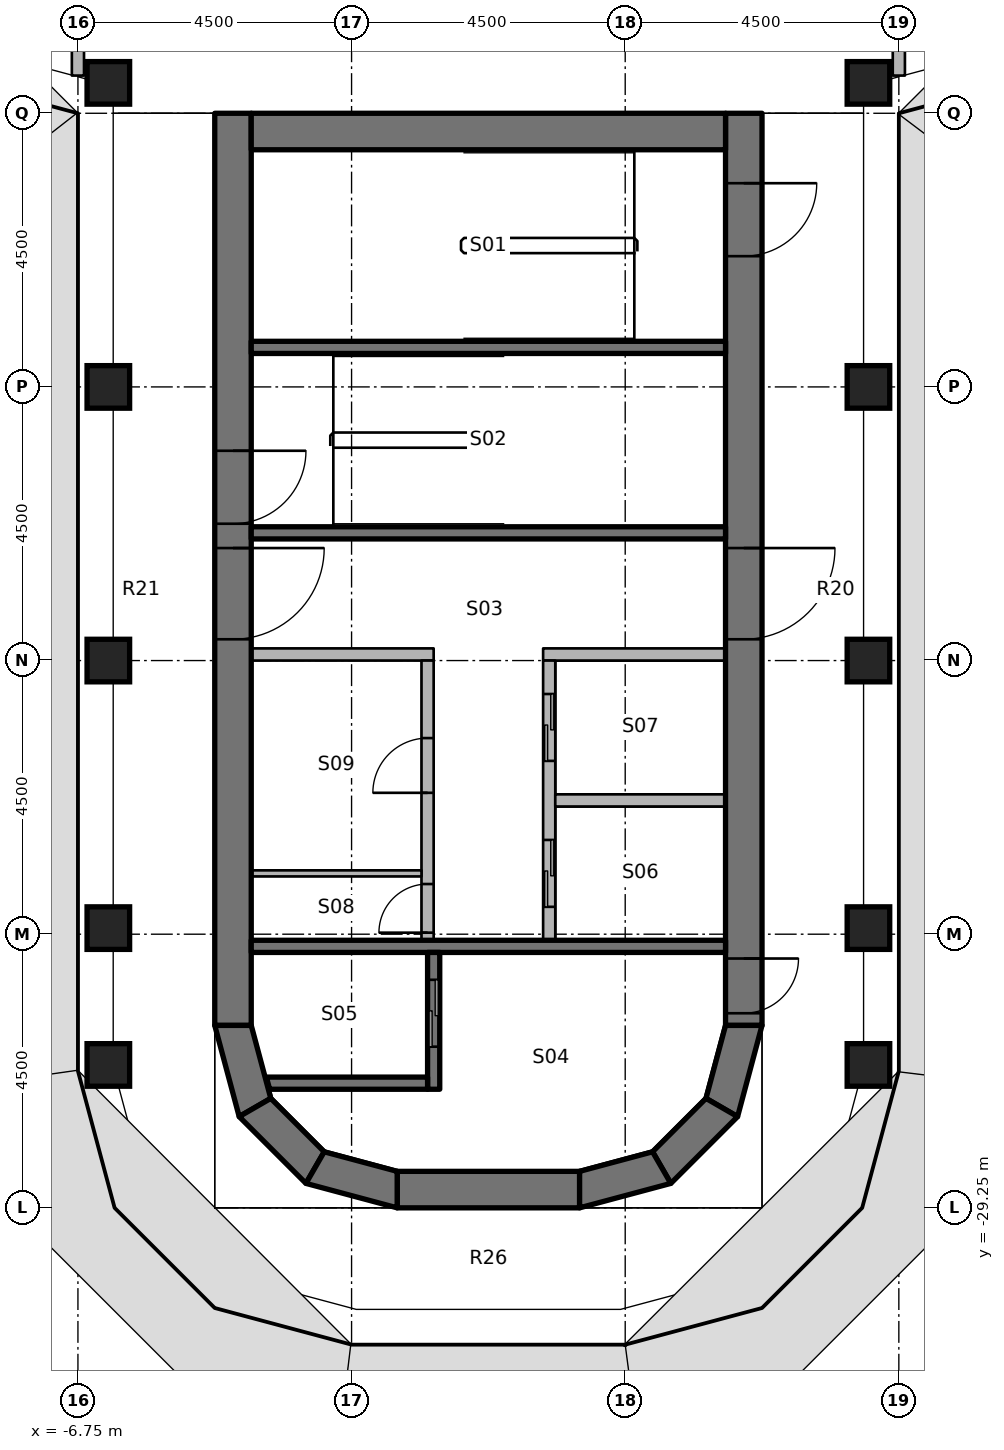
"""IFC4 building model, lengths in metres.
Left out: names, types, materials, properties, quantities, classifications, styles, units other than length and angle.
Written with IfcOpenShell. Run it as: python <this file> out.ifc"""

import sys

from ifc_helpers import new_model, si_unit, direction, frame, frame_2d, origin, origin_2d, place, context, subcontext, project, spatial, polyline, rectangle, outline, extrude, element, fill, save


model = new_model("IFC4")
c1 = context("Model", 3, precision=1e-05, world=origin(), true_north=direction((0.0, 1.0)))
c2 = subcontext(c1, "Body", "Model", "MODEL_VIEW")
j1 = project(units=[si_unit("LENGTHUNIT", "METRE"), si_unit("PLANEANGLEUNIT", "RADIAN")], contexts=[c1])
p1 = place(None, origin())
s1 = spatial("IfcSite", under=j1, at=p1, CompositionType="ELEMENT")
p2 = place(p1, origin())
s2 = spatial("IfcBuilding", under=s1, at=p2, CompositionType="ELEMENT")
p3 = place(p2, frame((0.0, 0.0, 206.8)))
s3 = spatial("IfcBuildingStorey", under=s2, at=p3, CompositionType="ELEMENT", Elevation=206.8)
for number, where, z_axis, x_axis in (
    (1, (-6.25, -26.9, 0.0), (0.0, 0.0, 1.0), (1.0, 0.0, 0.0)),
    (2, (-6.25, -24.65, 0.0), (0.0, 0.0, 1.0), (1.0, 0.0, 0.0)),
    (3, (-6.25, -20.25, 0.0), (0.0, 0.0, 1.0), (1.0, 0.0, 0.0)),
    (4, (-6.25, -15.75, 0.0), (0.0, 0.0, 1.0), (1.0, 0.0, 0.0)),
    (5, (-6.25, -10.75, 0.0), (0.0, 0.0, 1.0), (1.0, 0.0, 0.0)),
    (6, (6.25, -26.9, 0.0), (0.0, 0.0, 1.0), (1.0, 0.0, 0.0)),
    (7, (6.25, -24.65, 0.0), (0.0, 0.0, 1.0), (1.0, 0.0, 0.0)),
    (8, (6.25, -20.25, 0.0), (0.0, 0.0, 1.0), (1.0, 0.0, 0.0)),
    (9, (6.25, -15.75, 0.0), (0.0, 0.0, 1.0), (1.0, 0.0, 0.0)),
    (10, (6.25, -10.75, 0.0), (0.0, 0.0, 1.0), (1.0, 0.0, 0.0)),
):
    element("IfcColumn", number, at=place(p3, frame(where, z_axis=z_axis, x_axis=x_axis)), inside=s3, PredefinedType="COLUMN", context=c2, shape_type="SweptSolid", body=[
        extrude(rectangle(XDim=0.7, YDim=0.7, at=origin_2d()), origin(), (0.0, 0.0, 1.0), 3.65),
    ])
p4 = place(p3, frame((-4.2, -11.25, 0.0), z_axis=(0.0, 0.0, 1.0), x_axis=(0.0, -1.0, 0.0)))
e11 = element("IfcWall", 11, at=p4, inside=s3, PredefinedType="SHEAR", context=c2, shape_type="SweptSolid", body=[
    extrude(rectangle(XDim=15.0, YDim=0.6, at=frame_2d((7.5, 0.0))), origin(), (0.0, 0.0, 1.0), 3.8),
])
p5 = place(p4, frame((7.15, 0.0, 0.0)))
e12 = element("IfcOpeningElement", 12, at=p5, cuts=e11, PredefinedType="OPENING", context=c2, shape_type="SweptSolid", body=[
    extrude(rectangle(XDim=1.5, YDim=2.3, at=frame_2d((0.75, 1.15))), frame((0.0, 0.31, 0.0), z_axis=(0.0, -1.0, 0.0), x_axis=(1.0, 0.0, 0.0)), (0.0, 0.0, 1.0), 0.62),
])
p6 = place(p4, frame((5.55, 0.0, 0.0)))
e13 = element("IfcOpeningElement", 13, at=p6, cuts=e11, PredefinedType="OPENING", context=c2, shape_type="SweptSolid", body=[
    extrude(rectangle(XDim=1.2, YDim=2.1, at=frame_2d((0.6, 1.05))), frame((0.0, 0.31, 0.0), z_axis=(0.0, -1.0, 0.0), x_axis=(1.0, 0.0, 0.0)), (0.0, 0.0, 1.0), 0.62),
])
p7 = place(p3, frame((4.2, -11.25, 0.0), z_axis=(0.0, 0.0, 1.0), x_axis=(0.0, -1.0, 0.0)))
e14 = element("IfcWall", 14, at=p7, inside=s3, PredefinedType="SHEAR", context=c2, shape_type="SweptSolid", body=[
    extrude(rectangle(XDim=15.0, YDim=0.6, at=frame_2d((7.5, 0.0))), origin(), (0.0, 0.0, 1.0), 3.8),
])
p8 = place(p7, frame((7.15, 0.0, 0.0)))
e15 = element("IfcOpeningElement", 15, at=p8, cuts=e14, PredefinedType="OPENING", context=c2, shape_type="SweptSolid", body=[
    extrude(rectangle(XDim=1.5, YDim=2.3, at=frame_2d((0.75, 1.15))), frame((0.0, 0.31, 0.0), z_axis=(0.0, -1.0, 0.0), x_axis=(1.0, 0.0, 0.0)), (0.0, 0.0, 1.0), 0.62),
])
p9 = place(p7, frame((13.9, 0.0, 0.0)))
e16 = element("IfcOpeningElement", 16, at=p9, cuts=e14, PredefinedType="OPENING", context=c2, shape_type="SweptSolid", body=[
    extrude(rectangle(XDim=0.9, YDim=2.1, at=frame_2d((0.45, 1.05))), frame((0.0, 0.31, 0.0), z_axis=(0.0, -1.0, 0.0), x_axis=(1.0, 0.0, 0.0)), (0.0, 0.0, 1.0), 0.62),
])
p10 = place(p7, frame((1.15, 0.0, 0.0)))
e17 = element("IfcOpeningElement", 17, at=p10, cuts=e14, PredefinedType="OPENING", context=c2, shape_type="SweptSolid", body=[
    extrude(rectangle(XDim=1.2, YDim=2.1, at=frame_2d((0.6, 1.05))), frame((0.0, 0.31, 0.0), z_axis=(0.0, -1.0, 0.0), x_axis=(1.0, 0.0, 0.0)), (0.0, 0.0, 1.0), 0.62),
])
p11 = place(p3, frame((-3.9, -11.55, 0.0), z_axis=(0.0, 0.0, 1.0), x_axis=(1.0, 0.0, 0.0)))
e18 = element("IfcWall", 18, at=p11, inside=s3, PredefinedType="SHEAR", context=c2, shape_type="SweptSolid", body=[
    extrude(rectangle(XDim=7.8, YDim=0.6, at=frame_2d((3.9, 0.0))), origin(), (0.0, 0.0, 1.0), 3.8),
])
p12 = place(p3, frame((-1.5, -28.95, 0.0), z_axis=(0.0, 0.0, 1.0), x_axis=(1.0, 0.0, 0.0)))
e19 = element("IfcWall", 19, at=p12, inside=s3, PredefinedType="SHEAR", context=c2, shape_type="SweptSolid", body=[
    extrude(rectangle(XDim=3.0, YDim=0.6, at=frame_2d((1.5, 0.0))), origin(), (0.0, 0.0, 1.0), 3.8),
])
p13 = place(p3, origin())
e20 = element("IfcWall", 20, at=p13, inside=s3, PredefinedType="SHEAR", context=c2, shape_type="SweptSolid", body=[
    extrude(outline(polyline([(-4.5, -26.25), (-4.098, -27.75), (-3.579, -27.45), (-3.9, -26.25), (-4.5, -26.25)])), origin(), (0.0, 0.0, 1.0), 3.8),
])
p14 = place(p3, origin())
e21 = element("IfcWall", 21, at=p14, inside=s3, PredefinedType="SHEAR", context=c2, shape_type="SweptSolid", body=[
    extrude(outline(polyline([(-4.098, -27.75), (-3.0, -28.848), (-2.7, -28.329), (-3.579, -27.45), (-4.098, -27.75)])), origin(), (0.0, 0.0, 1.0), 3.8),
])
p15 = place(p3, origin())
e22 = element("IfcWall", 22, at=p15, inside=s3, PredefinedType="SHEAR", context=c2, shape_type="SweptSolid", body=[
    extrude(outline(polyline([(-3.0, -28.848), (-1.5, -29.25), (-1.5, -28.65), (-2.7, -28.329), (-3.0, -28.848)])), origin(), (0.0, 0.0, 1.0), 3.8),
])
p16 = place(p3, origin())
e23 = element("IfcWall", 23, at=p16, inside=s3, PredefinedType="SHEAR", context=c2, shape_type="SweptSolid", body=[
    extrude(outline(polyline([(4.5, -26.25), (4.098, -27.75), (3.579, -27.45), (3.9, -26.25), (4.5, -26.25)])), origin(), (0.0, 0.0, 1.0), 3.8),
])
p17 = place(p3, origin())
e24 = element("IfcWall", 24, at=p17, inside=s3, PredefinedType="SHEAR", context=c2, shape_type="SweptSolid", body=[
    extrude(outline(polyline([(4.098, -27.75), (3.0, -28.848), (2.7, -28.329), (3.579, -27.45), (4.098, -27.75)])), origin(), (0.0, 0.0, 1.0), 3.8),
])
p18 = place(p3, origin())
e25 = element("IfcWall", 25, at=p18, inside=s3, PredefinedType="SHEAR", context=c2, shape_type="SweptSolid", body=[
    extrude(outline(polyline([(3.0, -28.848), (1.5, -29.25), (1.5, -28.65), (2.7, -28.329), (3.0, -28.848)])), origin(), (0.0, 0.0, 1.0), 3.8),
])
p19 = place(p3, frame((3.9, -24.95, 0.0), z_axis=(0.0, 0.0, 1.0), x_axis=(-1.0, 0.0, 0.0)))
e26 = element("IfcWall", 26, at=p19, inside=s3, PredefinedType="SHEAR", context=c2, shape_type="SweptSolid", body=[
    extrude(rectangle(XDim=7.8, YDim=0.2, at=frame_2d((3.9, 0.0))), origin(), (0.0, 0.0, 1.0), 3.65),
])
p20 = place(p3, frame((-0.9, -27.3, 0.0), z_axis=(0.0, 0.0, 1.0), x_axis=(0.0, 1.0, 0.0)))
e27 = element("IfcWall", 27, at=p20, inside=s3, PredefinedType="SHEAR", context=c2, shape_type="SweptSolid", body=[
    extrude(rectangle(XDim=2.25, YDim=0.2, at=frame_2d((1.125, 0.0))), origin(), (0.0, 0.0, 1.0), 3.65),
])
p21 = place(p20, frame((0.7, 0.0, 0.0)))
e28 = element("IfcOpeningElement", 28, at=p21, cuts=e27, PredefinedType="OPENING", context=c2, shape_type="SweptSolid", body=[
    extrude(rectangle(XDim=1.1, YDim=2.3, at=frame_2d((0.55, 1.15))), frame((0.0, 0.11, 0.0), z_axis=(0.0, -1.0, 0.0), x_axis=(1.0, 0.0, 0.0)), (0.0, 0.0, 1.0), 0.22),
])
p22 = place(p3, origin())
e29 = element("IfcWall", 29, at=p22, inside=s3, PredefinedType="SHEAR", context=c2, shape_type="SweptSolid", body=[
    extrude(outline(polyline([(-1.0, -27.1), (-3.651, -27.1), (-3.597, -27.3), (-1.0, -27.3), (-1.0, -27.1)])), origin(), (0.0, 0.0, 1.0), 3.65),
])
for number, where, z_axis, x_axis in (
    (30, (3.9, -18.15, 0.0), (0.0, 0.0, 1.0), (-1.0, 0.0, 0.0)),
    (31, (3.9, -15.1, 0.0), (0.0, 0.0, 1.0), (-1.0, 0.0, 0.0)),
):
    element("IfcWall", number, at=place(p3, frame(where, z_axis=z_axis, x_axis=x_axis)), inside=s3, PredefinedType="SHEAR", context=c2, shape_type="SweptSolid", body=[
        extrude(rectangle(XDim=7.8, YDim=0.2, at=frame_2d((3.9, 0.0))), origin(), (0.0, 0.0, 1.0), 3.65),
    ])
p23 = place(p3, frame((3.9, -20.15, 0.0), z_axis=(0.0, 0.0, 1.0), x_axis=(-1.0, 0.0, 0.0)))
e32 = element("IfcWall", 32, at=p23, inside=s3, PredefinedType="PARTITIONING", context=c2, shape_type="SweptSolid", body=[
    extrude(rectangle(XDim=3.0, YDim=0.2, at=frame_2d((1.5, 0.0))), origin(), (0.0, 0.0, 1.0), 3.65),
])
p24 = place(p3, frame((1.0, -24.85, 0.0), z_axis=(0.0, 0.0, 1.0), x_axis=(0.0, 1.0, 0.0)))
e33 = element("IfcWall", 33, at=p24, inside=s3, PredefinedType="PARTITIONING", context=c2, shape_type="SweptSolid", body=[
    extrude(rectangle(XDim=4.6, YDim=0.2, at=frame_2d((2.3, 0.0))), origin(), (0.0, 0.0, 1.0), 3.65),
])
p25 = place(p24, frame((0.55, 0.0, 0.0)))
e34 = element("IfcOpeningElement", 34, at=p25, cuts=e33, PredefinedType="OPENING", context=c2, shape_type="SweptSolid", body=[
    extrude(rectangle(XDim=1.1, YDim=2.3, at=frame_2d((0.55, 1.15))), frame((0.0, 0.11, 0.0), z_axis=(0.0, -1.0, 0.0), x_axis=(1.0, 0.0, 0.0)), (0.0, 0.0, 1.0), 0.22),
])
p26 = place(p24, frame((2.95, 0.0, 0.0)))
e35 = element("IfcOpeningElement", 35, at=p26, cuts=e33, PredefinedType="OPENING", context=c2, shape_type="SweptSolid", body=[
    extrude(rectangle(XDim=1.1, YDim=2.3, at=frame_2d((0.55, 1.15))), frame((0.0, 0.11, 0.0), z_axis=(0.0, -1.0, 0.0), x_axis=(1.0, 0.0, 0.0)), (0.0, 0.0, 1.0), 0.22),
])
p27 = place(p3, frame((-0.9, -20.15, 0.0), z_axis=(0.0, 0.0, 1.0), x_axis=(-1.0, 0.0, 0.0)))
e36 = element("IfcWall", 36, at=p27, inside=s3, PredefinedType="PARTITIONING", context=c2, shape_type="SweptSolid", body=[
    extrude(rectangle(XDim=3.0, YDim=0.2, at=frame_2d((1.5, 0.0))), origin(), (0.0, 0.0, 1.0), 3.65),
])
p28 = place(p3, frame((-1.0, -24.85, 0.0), z_axis=(0.0, 0.0, 1.0), x_axis=(0.0, 1.0, 0.0)))
e37 = element("IfcWall", 37, at=p28, inside=s3, PredefinedType="PARTITIONING", context=c2, shape_type="SweptSolid", body=[
    extrude(rectangle(XDim=4.6, YDim=0.2, at=frame_2d((2.3, 0.0))), origin(), (0.0, 0.0, 1.0), 3.65),
])
p29 = place(p28, frame((0.125, 0.0, 0.0)))
e38 = element("IfcOpeningElement", 38, at=p29, cuts=e37, PredefinedType="OPENING", context=c2, shape_type="SweptSolid", body=[
    extrude(rectangle(XDim=0.8, YDim=2.1, at=frame_2d((0.4, 1.05))), frame((0.0, 0.11, 0.0), z_axis=(0.0, -1.0, 0.0), x_axis=(1.0, 0.0, 0.0)), (0.0, 0.0, 1.0), 0.22),
])
p30 = place(p28, frame((2.425, 0.0, 0.0)))
e39 = element("IfcOpeningElement", 39, at=p30, cuts=e37, PredefinedType="OPENING", context=c2, shape_type="SweptSolid", body=[
    extrude(rectangle(XDim=0.9, YDim=2.1, at=frame_2d((0.45, 1.05))), frame((0.0, 0.11, 0.0), z_axis=(0.0, -1.0, 0.0), x_axis=(1.0, 0.0, 0.0)), (0.0, 0.0, 1.0), 0.22),
])
p31 = place(p3, frame((3.9, -22.55, 0.0), z_axis=(0.0, 0.0, 1.0), x_axis=(-1.0, 0.0, 0.0)))
e40 = element("IfcWall", 40, at=p31, inside=s3, PredefinedType="PARTITIONING", context=c2, shape_type="SweptSolid", body=[
    extrude(rectangle(XDim=2.8, YDim=0.2, at=frame_2d((1.4, 0.0))), origin(), (0.0, 0.0, 1.0), 3.65),
])
p32 = place(p3, frame((-1.1, -23.75, 0.0), z_axis=(0.0, 0.0, 1.0), x_axis=(-1.0, 0.0, 0.0)))
e41 = element("IfcWall", 41, at=p32, inside=s3, PredefinedType="PARTITIONING", context=c2, shape_type="SweptSolid", body=[
    extrude(rectangle(XDim=2.8, YDim=0.1, at=frame_2d((1.4, 0.0))), origin(), (0.0, 0.0, 1.0), 3.65),
])
for number, where, z_axis, x_axis in (
    (42, (6.75, -10.63, 0.0), (0.0, 0.0, 1.0), (0.0, 1.0, 0.0)),
    (43, (-6.75, -10.63, 0.0), (0.0, 0.0, 1.0), (0.0, 1.0, 0.0)),
):
    element("IfcWall", number, at=place(p3, frame(where, z_axis=z_axis, x_axis=x_axis)), inside=s3, PredefinedType="PARTITIONING", context=c2, shape_type="SweptSolid", body=[
        extrude(rectangle(XDim=3.78, YDim=0.2, at=frame_2d((1.89, 0.0))), origin(), (0.0, 0.0, 1.0), 2.75),
    ])
p33 = place(p8, origin())
e44 = element("IfcDoor", 44, at=p33, inside=s3, OperationType="DOUBLE_DOOR_SINGLE_SWING", PredefinedType="DOOR", context=c2, shape_type="SweptSolid", body=[
    extrude(rectangle(XDim=1.5, YDim=2.3, at=frame_2d((0.75, 1.15))), frame((0.0, 0.025, 0.0), z_axis=(0.0, -1.0, 0.0), x_axis=(1.0, 0.0, 0.0)), (0.0, 0.0, 1.0), 0.05),
])
fill(e15, e44)
p34 = place(p5, origin())
e45 = element("IfcDoor", 45, at=p34, inside=s3, OperationType="DOUBLE_DOOR_SINGLE_SWING", PredefinedType="DOOR", context=c2, shape_type="SweptSolid", body=[
    extrude(rectangle(XDim=1.5, YDim=2.3, at=frame_2d((0.75, 1.15))), frame((0.0, 0.025, 0.0), z_axis=(0.0, -1.0, 0.0), x_axis=(1.0, 0.0, 0.0)), (0.0, 0.0, 1.0), 0.05),
])
fill(e12, e45)
p35 = place(p9, origin())
e46 = element("IfcDoor", 46, at=p35, inside=s3, OperationType="SINGLE_SWING_RIGHT", PredefinedType="DOOR", context=c2, shape_type="SweptSolid", body=[
    extrude(rectangle(XDim=0.9, YDim=2.1, at=frame_2d((0.45, 1.05))), frame((0.0, 0.025, 0.0), z_axis=(0.0, -1.0, 0.0), x_axis=(1.0, 0.0, 0.0)), (0.0, 0.0, 1.0), 0.05),
])
fill(e16, e46)
p36 = place(p6, origin())
e47 = element("IfcDoor", 47, at=p36, inside=s3, OperationType="SINGLE_SWING_LEFT", PredefinedType="DOOR", context=c2, shape_type="SweptSolid", body=[
    extrude(rectangle(XDim=1.2, YDim=2.1, at=frame_2d((0.6, 1.05))), frame((0.0, 0.025, 0.0), z_axis=(0.0, -1.0, 0.0), x_axis=(1.0, 0.0, 0.0)), (0.0, 0.0, 1.0), 0.05),
])
fill(e13, e47)
p37 = place(p10, origin())
e48 = element("IfcDoor", 48, at=p37, inside=s3, OperationType="SINGLE_SWING_LEFT", PredefinedType="DOOR", context=c2, shape_type="SweptSolid", body=[
    extrude(rectangle(XDim=1.2, YDim=2.1, at=frame_2d((0.6, 1.05))), frame((0.0, 0.025, 0.0), z_axis=(0.0, -1.0, 0.0), x_axis=(1.0, 0.0, 0.0)), (0.0, 0.0, 1.0), 0.05),
])
fill(e17, e48)
p38 = place(p21, origin())
e49 = element("IfcDoor", 49, at=p38, inside=s3, OperationType="DOUBLE_DOOR_SLIDING", PredefinedType="DOOR", context=c2, shape_type="SweptSolid", body=[
    extrude(rectangle(XDim=1.1, YDim=2.3, at=frame_2d((0.55, 1.15))), frame((0.0, 0.025, 0.0), z_axis=(0.0, -1.0, 0.0), x_axis=(1.0, 0.0, 0.0)), (0.0, 0.0, 1.0), 0.05),
])
fill(e28, e49)
p39 = place(p25, origin())
e50 = element("IfcDoor", 50, at=p39, inside=s3, OperationType="DOUBLE_DOOR_SLIDING", PredefinedType="DOOR", context=c2, shape_type="SweptSolid", body=[
    extrude(rectangle(XDim=1.1, YDim=2.3, at=frame_2d((0.55, 1.15))), frame((0.0, 0.025, 0.0), z_axis=(0.0, -1.0, 0.0), x_axis=(1.0, 0.0, 0.0)), (0.0, 0.0, 1.0), 0.05),
])
fill(e34, e50)
p40 = place(p26, origin())
e51 = element("IfcDoor", 51, at=p40, inside=s3, OperationType="DOUBLE_DOOR_SLIDING", PredefinedType="DOOR", context=c2, shape_type="SweptSolid", body=[
    extrude(rectangle(XDim=1.1, YDim=2.3, at=frame_2d((0.55, 1.15))), frame((0.0, 0.025, 0.0), z_axis=(0.0, -1.0, 0.0), x_axis=(1.0, 0.0, 0.0)), (0.0, 0.0, 1.0), 0.05),
])
fill(e35, e51)
p41 = place(p29, origin())
e52 = element("IfcDoor", 52, at=p41, inside=s3, OperationType="SINGLE_SWING_LEFT", PredefinedType="DOOR", context=c2, shape_type="SweptSolid", body=[
    extrude(rectangle(XDim=0.8, YDim=2.1, at=frame_2d((0.4, 1.05))), frame((0.0, 0.025, 0.0), z_axis=(0.0, -1.0, 0.0), x_axis=(1.0, 0.0, 0.0)), (0.0, 0.0, 1.0), 0.05),
])
fill(e38, e52)
p42 = place(p30, origin())
e53 = element("IfcDoor", 53, at=p42, inside=s3, OperationType="SINGLE_SWING_RIGHT", PredefinedType="DOOR", context=c2, shape_type="SweptSolid", body=[
    extrude(rectangle(XDim=0.9, YDim=2.1, at=frame_2d((0.45, 1.05))), frame((0.0, 0.025, 0.0), z_axis=(0.0, -1.0, 0.0), x_axis=(1.0, 0.0, 0.0)), (0.0, 0.0, 1.0), 0.05),
])
fill(e39, e53)
save(model, sys.argv[1])
